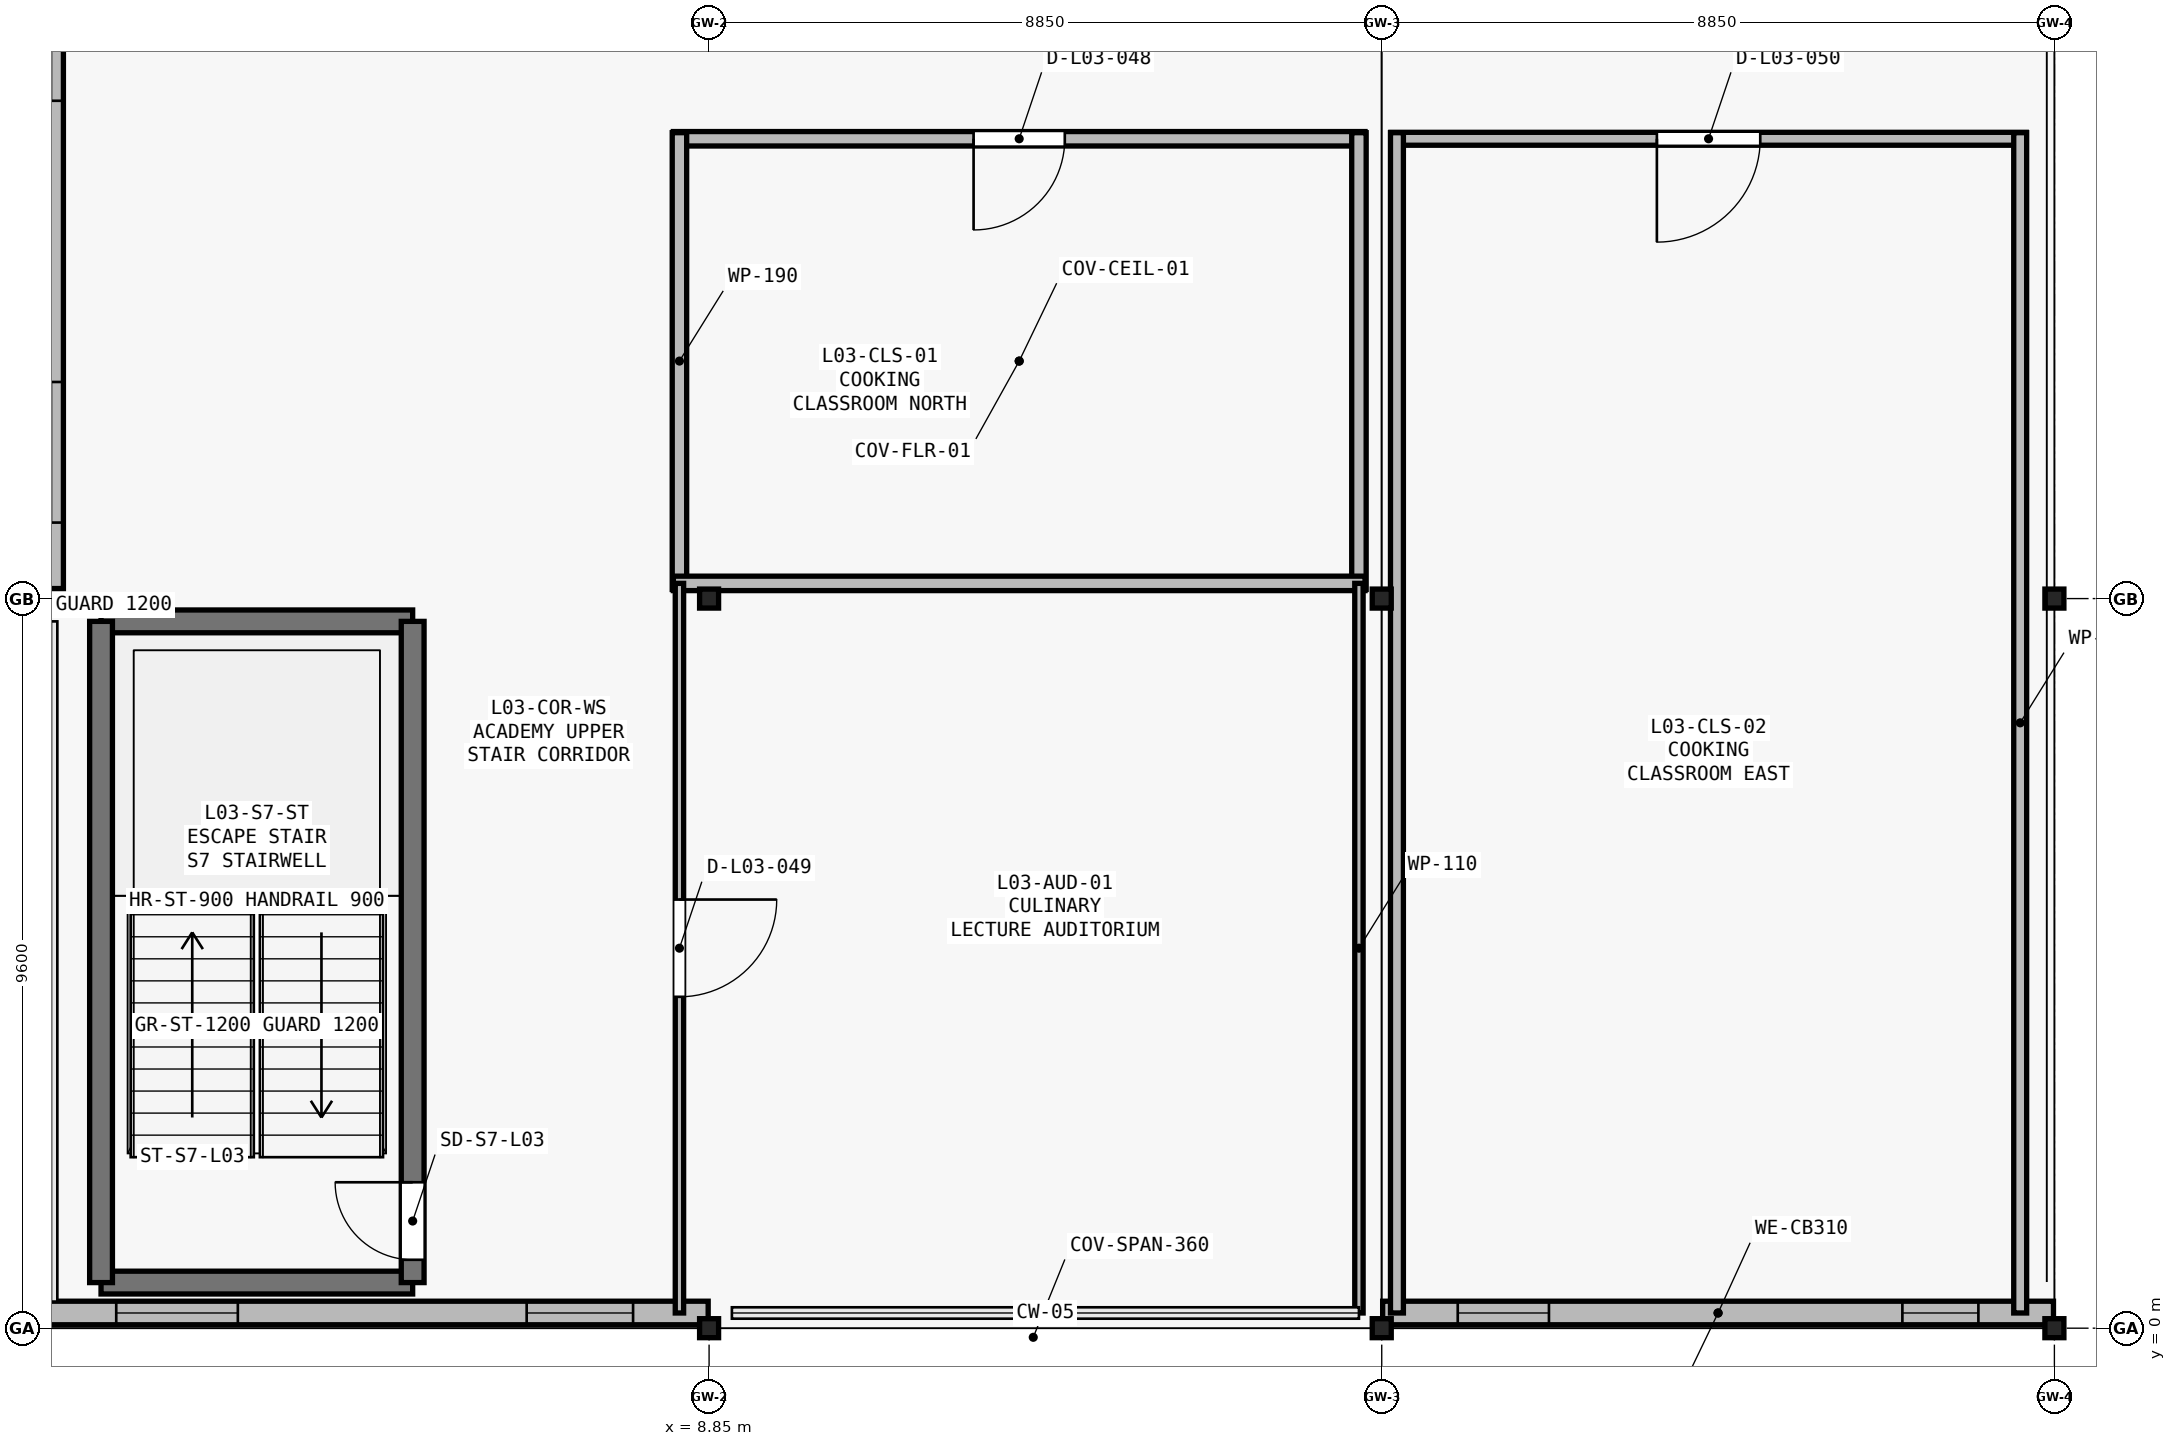
"""IFC4 building model, lengths in metres.
Left out: names, types, materials, properties, quantities, classifications, styles, units other than length and angle.
Written with IfcOpenShell. Run it as: python <this file> out.ifc"""

import sys

from ifc_helpers import new_model, si_unit, direction, frame, frame_2d, origin, origin_2d, place, context, subcontext, project, spatial, rectangle, i_section, extrude, element, fill, save


model = new_model("IFC4")
c1 = context("Model", 3, precision=1e-05, world=origin(), true_north=direction((0.0, 1.0)))
c2 = subcontext(c1, "Body", "Model", "MODEL_VIEW")
j1 = project(units=[si_unit("LENGTHUNIT", "METRE"), si_unit("PLANEANGLEUNIT", "RADIAN")], contexts=[c1])
p1 = place(None, origin())
s1 = spatial("IfcSite", under=j1, at=p1, CompositionType="ELEMENT")
p2 = place(p1, origin())
s2 = spatial("IfcBuilding", under=s1, at=p2, CompositionType="ELEMENT")
p3 = place(p2, frame((0.0, 0.0, 15.0)))
s3 = spatial("IfcBuildingStorey", under=s2, at=p3, CompositionType="ELEMENT", Elevation=15.0)
for number, where, z_axis, x_axis in (
    (1, (8.85, 0.0, 0.0), (0.0, 0.0, 1.0), (1.0, 0.0, 0.0)),
    (2, (8.85, 9.6, 0.0), (0.0, 0.0, 1.0), (1.0, 0.0, 0.0)),
    (3, (17.7, 0.0, 0.0), (0.0, 0.0, 1.0), (1.0, 0.0, 0.0)),
    (4, (17.7, 9.6, 0.0), (0.0, 0.0, 1.0), (1.0, 0.0, 0.0)),
    (5, (26.55, 0.0, 0.0), (0.0, 0.0, 1.0), (1.0, 0.0, 0.0)),
    (6, (26.55, 9.6, 0.0), (0.0, 0.0, 1.0), (1.0, 0.0, 0.0)),
):
    element("IfcColumn", number, at=place(p3, frame(where, z_axis=z_axis, x_axis=x_axis)), inside=s3, PredefinedType="COLUMN", context=c2, shape_type="SweptSolid", body=[
        extrude(i_section(OverallWidth=0.25, OverallDepth=0.25, WebThickness=0.009, FlangeThickness=0.014, FilletRadius=0.016, at=origin_2d()), origin(), (0.0, 0.0, 1.0), 4.2),
    ])
p4 = place(p3, frame((26.538, 0.2, 0.0), z_axis=(0.0, 0.0, 1.0), x_axis=(-1.0, 0.0, 0.0)))
e7 = element("IfcWall", 7, at=p4, inside=s3, PredefinedType="SOLIDWALL", context=c2, shape_type="SweptSolid", body=[
    extrude(rectangle(XDim=8.826, YDim=0.31, at=frame_2d((4.413, 0.0))), origin(), (0.0, 0.0, 1.0), 3.35),
])
p5 = place(p4, frame((0.988, 0.0, 0.95)))
e8 = element("IfcOpeningElement", 8, at=p5, cuts=e7, PredefinedType="OPENING", context=c2, shape_type="SweptSolid", body=[
    extrude(rectangle(XDim=1.0, YDim=1.95, at=frame_2d((0.5, 0.975))), frame((0.0, 0.165, 0.0), z_axis=(0.0, -1.0, 0.0), x_axis=(1.0, 0.0, 0.0)), (0.0, 0.0, 1.0), 0.33),
])
p6 = place(p4, frame((6.638, 0.0, 0.95)))
e9 = element("IfcOpeningElement", 9, at=p6, cuts=e7, PredefinedType="OPENING", context=c2, shape_type="SweptSolid", body=[
    extrude(rectangle(XDim=1.2, YDim=1.95, at=frame_2d((0.6, 0.975))), frame((0.0, 0.165, 0.0), z_axis=(0.0, -1.0, 0.0), x_axis=(1.0, 0.0, 0.0)), (0.0, 0.0, 1.0), 0.33),
])
p7 = place(p3, frame((8.838, 0.2, 0.0), z_axis=(0.0, 0.0, 1.0), x_axis=(-1.0, 0.0, 0.0)))
e10 = element("IfcWall", 10, at=p7, inside=s3, PredefinedType="SOLIDWALL", context=c2, shape_type="SweptSolid", body=[
    extrude(rectangle(XDim=8.826, YDim=0.31, at=frame_2d((4.413, 0.0))), origin(), (0.0, 0.0, 1.0), 3.35),
])
p8 = place(p7, frame((0.988, 0.0, 0.95)))
e11 = element("IfcOpeningElement", 11, at=p8, cuts=e10, PredefinedType="OPENING", context=c2, shape_type="SweptSolid", body=[
    extrude(rectangle(XDim=1.4, YDim=1.95, at=frame_2d((0.7, 0.975))), frame((0.0, 0.165, 0.0), z_axis=(0.0, -1.0, 0.0), x_axis=(1.0, 0.0, 0.0)), (0.0, 0.0, 1.0), 0.33),
])
p9 = place(p7, frame((6.188, 0.0, 0.95)))
e12 = element("IfcOpeningElement", 12, at=p9, cuts=e10, PredefinedType="OPENING", context=c2, shape_type="SweptSolid", body=[
    extrude(rectangle(XDim=1.6, YDim=1.95, at=frame_2d((0.8, 0.975))), frame((0.0, 0.165, 0.0), z_axis=(0.0, -1.0, 0.0), x_axis=(1.0, 0.0, 0.0)), (0.0, 0.0, 1.0), 0.33),
])
p10 = place(p3, frame((0.2, 9.732, 0.0), z_axis=(0.0, 0.0, 1.0), x_axis=(0.0, 1.0, 0.0)))
e13 = element("IfcWall", 13, at=p10, inside=s3, PredefinedType="SOLIDWALL", context=c2, shape_type="SweptSolid", body=[
    extrude(rectangle(XDim=9.336, YDim=0.31, at=frame_2d((4.668, 0.0))), origin(), (0.0, 0.0, 1.0), 3.35),
])
p11 = place(p10, frame((0.868, 0.0, 0.95)))
e14 = element("IfcOpeningElement", 14, at=p11, cuts=e13, PredefinedType="OPENING", context=c2, shape_type="SweptSolid", body=[
    extrude(rectangle(XDim=1.85, YDim=1.95, at=frame_2d((0.925, 0.975))), frame((0.0, 0.165, 0.0), z_axis=(0.0, -1.0, 0.0), x_axis=(1.0, 0.0, 0.0)), (0.0, 0.0, 1.0), 0.33),
])
p12 = place(p10, frame((6.418, 0.0, 0.95)))
e15 = element("IfcOpeningElement", 15, at=p12, cuts=e13, PredefinedType="OPENING", context=c2, shape_type="SweptSolid", body=[
    extrude(rectangle(XDim=2.05, YDim=1.95, at=frame_2d((1.025, 0.975))), frame((0.0, 0.165, 0.0), z_axis=(0.0, -1.0, 0.0), x_axis=(1.0, 0.0, 0.0)), (0.0, 0.0, 1.0), 0.33),
])
for number, where, z_axis, x_axis in (
    (16, (0.85, 0.6, 0.0), (0.0, 0.0, 1.0), (1.0, 0.0, 0.0)),
    (17, (4.95, 9.3, 0.0), (0.0, 0.0, 1.0), (-1.0, 0.0, 0.0)),
):
    element("IfcWall", number, at=place(p3, frame(where, z_axis=z_axis, x_axis=x_axis)), inside=s3, PredefinedType="SHEAR", context=c2, shape_type="SweptSolid", body=[
        extrude(rectangle(XDim=4.1, YDim=0.3, at=frame_2d((2.05, 0.0))), origin(), (0.0, 0.0, 1.0), 4.2),
    ])
p13 = place(p3, frame((0.85, 9.3, 0.0), z_axis=(0.0, 0.0, 1.0), x_axis=(0.0, -1.0, 0.0)))
e18 = element("IfcWall", 18, at=p13, inside=s3, PredefinedType="SHEAR", context=c2, shape_type="SweptSolid", body=[
    extrude(rectangle(XDim=8.7, YDim=0.3, at=frame_2d((4.35, 0.0))), origin(), (0.0, 0.0, 1.0), 4.2),
])
p14 = place(p3, frame((4.95, 0.6, 0.0), z_axis=(0.0, 0.0, 1.0), x_axis=(0.0, 1.0, 0.0)))
e19 = element("IfcWall", 19, at=p14, inside=s3, PredefinedType="SHEAR", context=c2, shape_type="SweptSolid", body=[
    extrude(rectangle(XDim=8.7, YDim=0.3, at=frame_2d((4.35, 0.0))), origin(), (0.0, 0.0, 1.0), 4.2),
])
p15 = place(p14, frame((0.3, 0.0, 0.0)))
e20 = element("IfcOpeningElement", 20, at=p15, cuts=e19, PredefinedType="OPENING", context=c2, shape_type="SweptSolid", body=[
    extrude(rectangle(XDim=1.02, YDim=2.1, at=frame_2d((0.51, 1.05))), frame((0.0, 0.16, 0.0), z_axis=(0.0, -1.0, 0.0), x_axis=(1.0, 0.0, 0.0)), (0.0, 0.0, 1.0), 0.32),
])
p16 = place(p3, frame((17.48, 15.65, 0.0), z_axis=(0.0, 0.0, 1.0), x_axis=(-1.0, 0.0, 0.0)))
e21 = element("IfcWall", 21, at=p16, inside=s3, PredefinedType="PARTITIONING", context=c2, shape_type="SweptSolid", body=[
    extrude(rectangle(XDim=9.1, YDim=0.19, at=frame_2d((4.55, 0.0))), origin(), (0.0, 0.0, 1.0), 3.72),
])
p17 = place(p16, frame((3.95, 0.0, 0.0)))
e22 = element("IfcOpeningElement", 22, at=p17, cuts=e21, PredefinedType="OPENING", context=c2, shape_type="SweptSolid", body=[
    extrude(rectangle(XDim=1.2, YDim=2.1, at=frame_2d((0.6, 1.05))), frame((0.0, 0.105, 0.0), z_axis=(0.0, -1.0, 0.0), x_axis=(1.0, 0.0, 0.0)), (0.0, 0.0, 1.0), 0.21),
])
for number, where, z_axis, x_axis in (
    (23, (8.46, 15.73, 0.0), (0.0, 0.0, 1.0), (0.0, -1.0, 0.0)),
    (24, (17.4, 9.72, 0.0), (0.0, 0.0, 1.0), (0.0, 1.0, 0.0)),
):
    element("IfcWall", number, at=place(p3, frame(where, z_axis=z_axis, x_axis=x_axis)), inside=s3, PredefinedType="PARTITIONING", context=c2, shape_type="SweptSolid", body=[
        extrude(rectangle(XDim=6.01, YDim=0.19, at=frame_2d((3.005, 0.0))), origin(), (0.0, 0.0, 1.0), 3.72),
    ])
p18 = place(p3, frame((8.38, 9.8, 0.0), z_axis=(0.0, 0.0, 1.0), x_axis=(1.0, 0.0, 0.0)))
e25 = element("IfcWall", 25, at=p18, inside=s3, PredefinedType="PARTITIONING", context=c2, shape_type="SweptSolid", body=[
    extrude(rectangle(XDim=9.1, YDim=0.19, at=frame_2d((4.55, 0.0))), origin(), (0.0, 0.0, 1.0), 3.412),
])
p19 = place(p3, frame((8.46, 9.8, 0.0), z_axis=(0.0, 0.0, 1.0), x_axis=(0.0, -1.0, 0.0)))
e26 = element("IfcWall", 26, at=p19, inside=s3, PredefinedType="PARTITIONING", context=c2, shape_type="SweptSolid", body=[
    extrude(rectangle(XDim=9.6, YDim=0.11, at=frame_2d((4.8, 0.0))), origin(), (0.0, 0.0, 1.0), 3.72),
])
p20 = place(p19, frame((4.16, 0.0, 0.0)))
e27 = element("IfcOpeningElement", 27, at=p20, cuts=e26, PredefinedType="OPENING", context=c2, shape_type="SweptSolid", body=[
    extrude(rectangle(XDim=1.28, YDim=2.15, at=frame_2d((0.64, 1.075))), frame((0.0, 0.065, 0.0), z_axis=(0.0, -1.0, 0.0), x_axis=(1.0, 0.0, 0.0)), (0.0, 0.0, 1.0), 0.13),
])
p21 = place(p3, frame((17.4, 0.2, 0.0), z_axis=(0.0, 0.0, 1.0), x_axis=(0.0, 1.0, 0.0)))
e28 = element("IfcWall", 28, at=p21, inside=s3, PredefinedType="PARTITIONING", context=c2, shape_type="SweptSolid", body=[
    extrude(rectangle(XDim=9.6, YDim=0.11, at=frame_2d((4.8, 0.0))), origin(), (0.0, 0.0, 1.0), 3.72),
])
p22 = place(p3, frame((26.18, 15.65, 0.0), z_axis=(0.0, 0.0, 1.0), x_axis=(-1.0, 0.0, 0.0)))
e29 = element("IfcWall", 29, at=p22, inside=s3, PredefinedType="PARTITIONING", context=c2, shape_type="SweptSolid", body=[
    extrude(rectangle(XDim=8.36, YDim=0.17, at=frame_2d((4.18, 0.0))), origin(), (0.0, 0.0, 1.0), 3.72),
])
p23 = place(p22, frame((3.5, 0.0, 0.0)))
e30 = element("IfcOpeningElement", 30, at=p23, cuts=e29, PredefinedType="OPENING", context=c2, shape_type="SweptSolid", body=[
    extrude(rectangle(XDim=1.36, YDim=2.15, at=frame_2d((0.68, 1.075))), frame((0.0, 0.095, 0.0), z_axis=(0.0, -1.0, 0.0), x_axis=(1.0, 0.0, 0.0)), (0.0, 0.0, 1.0), 0.19),
])
p24 = place(p3, frame((26.1, 0.2, 0.0), z_axis=(0.0, 0.0, 1.0), x_axis=(0.0, 1.0, 0.0)))
e31 = element("IfcWall", 31, at=p24, inside=s3, PredefinedType="PARTITIONING", context=c2, shape_type="SweptSolid", body=[
    extrude(rectangle(XDim=15.53, YDim=0.17, at=frame_2d((7.765, 0.0))), origin(), (0.0, 0.0, 1.0), 3.72),
])
p25 = place(p3, frame((17.9, 15.73, 0.0), z_axis=(0.0, 0.0, 1.0), x_axis=(0.0, -1.0, 0.0)))
e32 = element("IfcWall", 32, at=p25, inside=s3, PredefinedType="PARTITIONING", context=c2, shape_type="SweptSolid", body=[
    extrude(rectangle(XDim=15.53, YDim=0.17, at=frame_2d((7.765, 0.0))), origin(), (0.0, 0.0, 1.0), 3.4),
])
p26 = place(p5, origin())
e33 = element("IfcWindow", 33, at=p26, inside=s3, PartitioningType="SINGLE_PANEL", PredefinedType="WINDOW", context=c2, shape_type="SweptSolid", body=[
    extrude(rectangle(XDim=1.0, YDim=1.95, at=frame_2d((0.5, 0.975))), frame((0.0, 0.03, 0.0), z_axis=(0.0, -1.0, 0.0), x_axis=(1.0, 0.0, 0.0)), (0.0, 0.0, 1.0), 0.06),
])
fill(e8, e33)
p27 = place(p6, origin())
e34 = element("IfcWindow", 34, at=p27, inside=s3, PartitioningType="SINGLE_PANEL", PredefinedType="WINDOW", context=c2, shape_type="SweptSolid", body=[
    extrude(rectangle(XDim=1.2, YDim=1.95, at=frame_2d((0.6, 0.975))), frame((0.0, 0.03, 0.0), z_axis=(0.0, -1.0, 0.0), x_axis=(1.0, 0.0, 0.0)), (0.0, 0.0, 1.0), 0.06),
])
fill(e9, e34)
p28 = place(p8, origin())
e35 = element("IfcWindow", 35, at=p28, inside=s3, PartitioningType="SINGLE_PANEL", PredefinedType="WINDOW", context=c2, shape_type="SweptSolid", body=[
    extrude(rectangle(XDim=1.4, YDim=1.95, at=frame_2d((0.7, 0.975))), frame((0.0, 0.03, 0.0), z_axis=(0.0, -1.0, 0.0), x_axis=(1.0, 0.0, 0.0)), (0.0, 0.0, 1.0), 0.06),
])
fill(e11, e35)
p29 = place(p9, origin())
e36 = element("IfcWindow", 36, at=p29, inside=s3, PartitioningType="SINGLE_PANEL", PredefinedType="WINDOW", context=c2, shape_type="SweptSolid", body=[
    extrude(rectangle(XDim=1.6, YDim=1.95, at=frame_2d((0.8, 0.975))), frame((0.0, 0.03, 0.0), z_axis=(0.0, -1.0, 0.0), x_axis=(1.0, 0.0, 0.0)), (0.0, 0.0, 1.0), 0.06),
])
fill(e12, e36)
p30 = place(p11, origin())
e37 = element("IfcWindow", 37, at=p30, inside=s3, PartitioningType="SINGLE_PANEL", PredefinedType="WINDOW", context=c2, shape_type="SweptSolid", body=[
    extrude(rectangle(XDim=1.85, YDim=1.95, at=frame_2d((0.925, 0.975))), frame((0.0, 0.03, 0.0), z_axis=(0.0, -1.0, 0.0), x_axis=(1.0, 0.0, 0.0)), (0.0, 0.0, 1.0), 0.06),
])
fill(e14, e37)
p31 = place(p12, origin())
e38 = element("IfcWindow", 38, at=p31, inside=s3, PartitioningType="SINGLE_PANEL", PredefinedType="WINDOW", context=c2, shape_type="SweptSolid", body=[
    extrude(rectangle(XDim=2.05, YDim=1.95, at=frame_2d((1.025, 0.975))), frame((0.0, 0.03, 0.0), z_axis=(0.0, -1.0, 0.0), x_axis=(1.0, 0.0, 0.0)), (0.0, 0.0, 1.0), 0.06),
])
fill(e15, e38)
p32 = place(p15, origin())
e39 = element("IfcDoor", 39, at=p32, inside=s3, OperationType="SINGLE_SWING_RIGHT", PredefinedType="DOOR", context=c2, shape_type="SweptSolid", body=[
    extrude(rectangle(XDim=1.02, YDim=2.1, at=frame_2d((0.51, 1.05))), frame((0.0, 0.025, 0.0), z_axis=(0.0, -1.0, 0.0), x_axis=(1.0, 0.0, 0.0)), (0.0, 0.0, 1.0), 0.05),
])
fill(e20, e39)
p33 = place(p17, origin())
e40 = element("IfcDoor", 40, at=p33, inside=s3, OperationType="SINGLE_SWING_RIGHT", PredefinedType="DOOR", context=c2, shape_type="SweptSolid", body=[
    extrude(rectangle(XDim=1.2, YDim=2.1, at=frame_2d((0.6, 1.05))), frame((0.0, 0.025, 0.0), z_axis=(0.0, -1.0, 0.0), x_axis=(1.0, 0.0, 0.0)), (0.0, 0.0, 1.0), 0.05),
])
fill(e22, e40)
p34 = place(p20, origin())
e41 = element("IfcDoor", 41, at=p34, inside=s3, OperationType="SINGLE_SWING_LEFT", PredefinedType="DOOR", context=c2, shape_type="SweptSolid", body=[
    extrude(rectangle(XDim=1.28, YDim=2.15, at=frame_2d((0.64, 1.075))), frame((0.0, 0.025, 0.0), z_axis=(0.0, -1.0, 0.0), x_axis=(1.0, 0.0, 0.0)), (0.0, 0.0, 1.0), 0.05),
])
fill(e27, e41)
p35 = place(p23, origin())
e42 = element("IfcDoor", 42, at=p35, inside=s3, OperationType="SINGLE_SWING_RIGHT", PredefinedType="DOOR", context=c2, shape_type="SweptSolid", body=[
    extrude(rectangle(XDim=1.36, YDim=2.15, at=frame_2d((0.68, 1.075))), frame((0.0, 0.025, 0.0), z_axis=(0.0, -1.0, 0.0), x_axis=(1.0, 0.0, 0.0)), (0.0, 0.0, 1.0), 0.05),
])
fill(e30, e42)
save(model, sys.argv[1])
